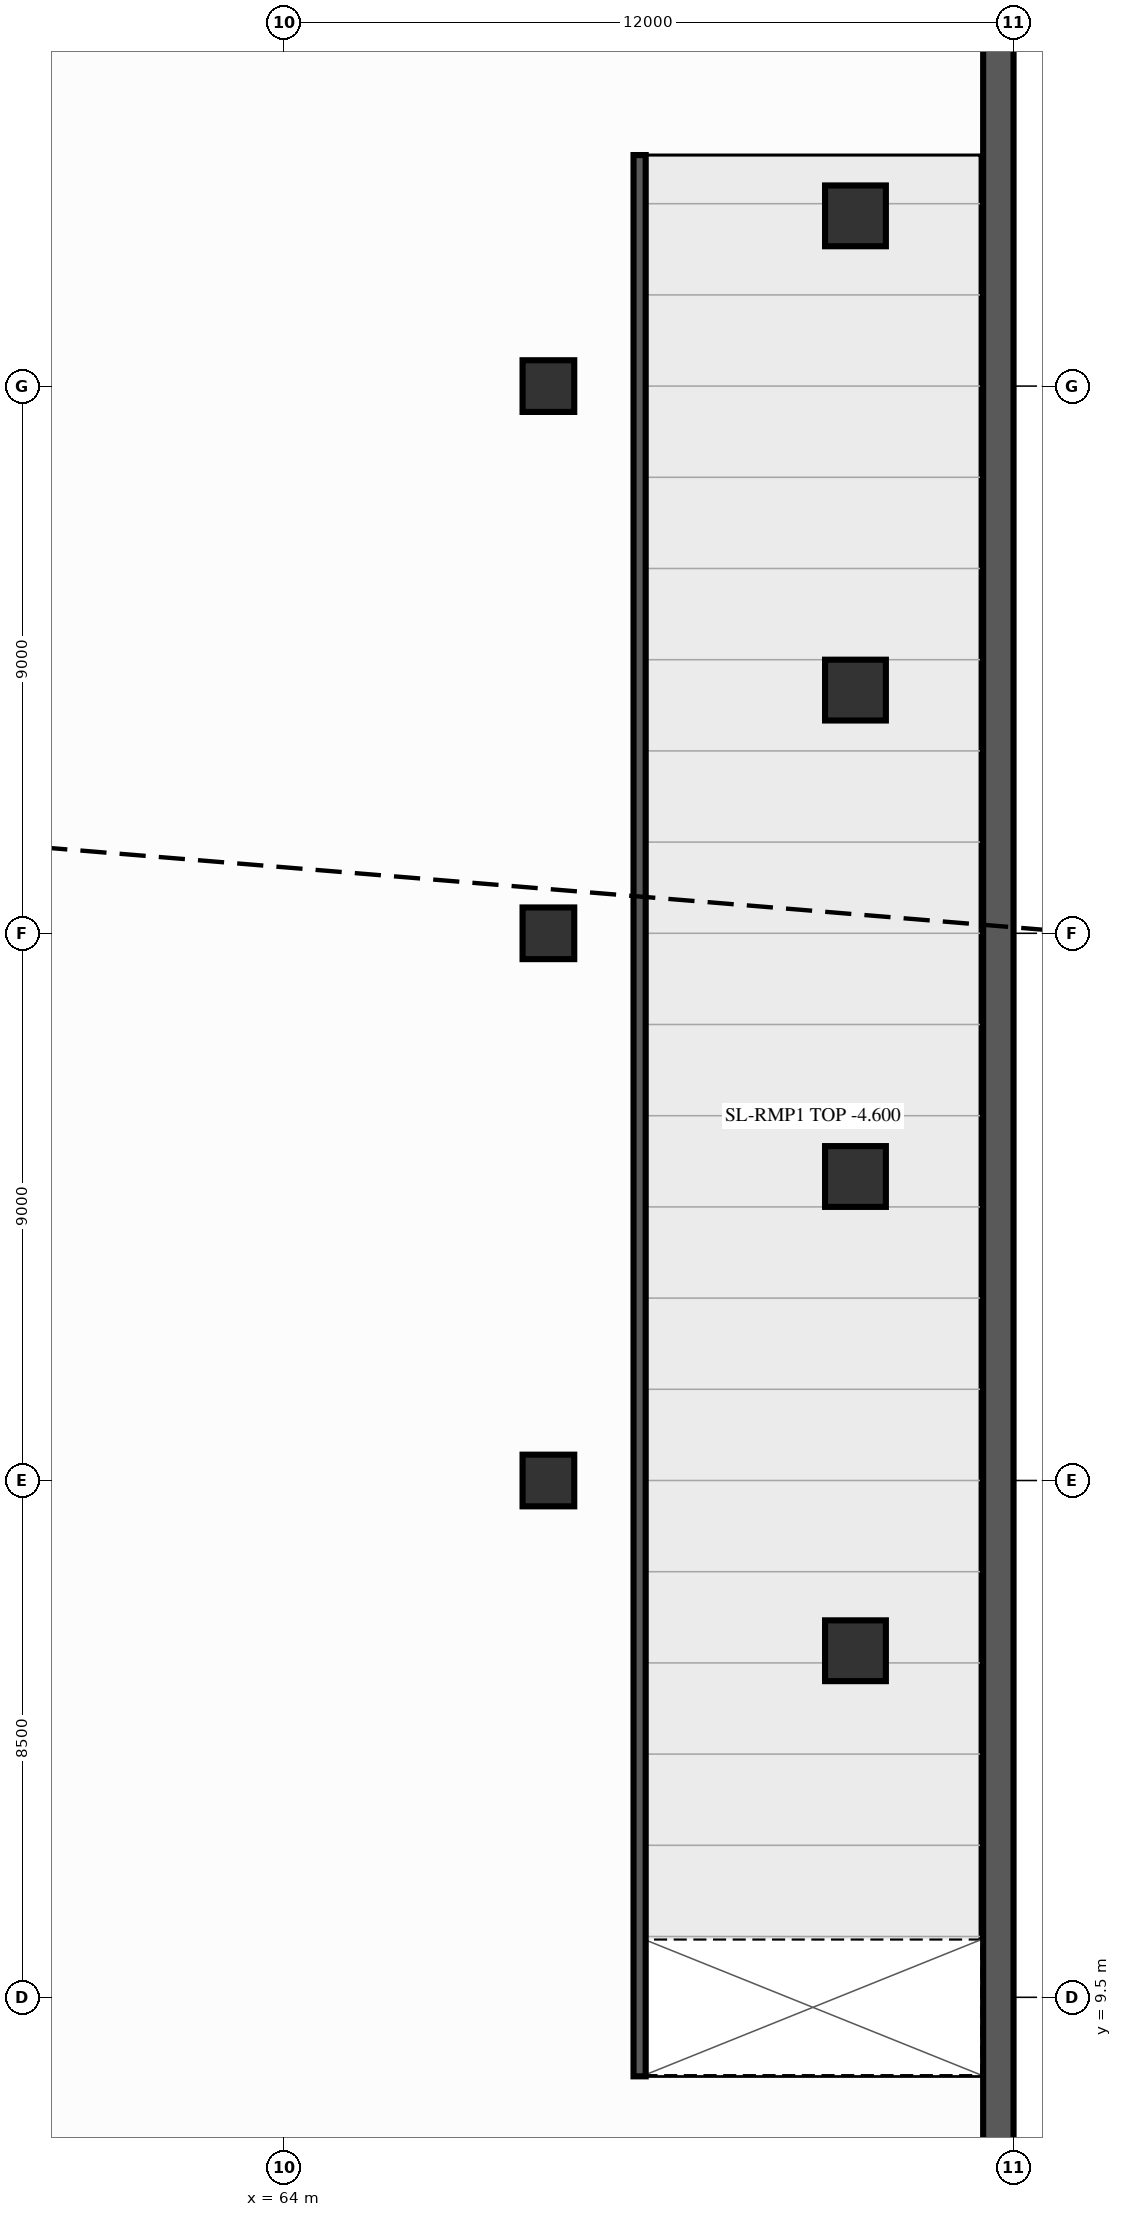
"""IFC4 building model, lengths in metres.
Left out: names, types, materials, properties, quantities, classifications, styles, units other than length and angle.
Written with IfcOpenShell. Run it as: python <this file> out.ifc"""

import sys

from ifc_helpers import new_model, si_unit, direction, frame, frame_2d, origin, origin_2d, place, context, subcontext, project, spatial, rectangle, circle, extrude, source, transform, mapped, element, save


model = new_model("IFC4")
c1 = context("Model", 3, precision=1e-05, world=origin(), true_north=direction((0.0, 1.0)))
c2 = subcontext(c1, "Body", "Model", "MODEL_VIEW")
j1 = project(units=[si_unit("LENGTHUNIT", "METRE"), si_unit("PLANEANGLEUNIT", "RADIAN")], contexts=[c1])
p1 = place(None, origin())
s1 = spatial("IfcSite", under=j1, at=p1, CompositionType="ELEMENT")
p2 = place(p1, origin())
s2 = spatial("IfcBuilding", under=s1, at=p2, CompositionType="ELEMENT")
p3 = place(p2, frame((0.0, 0.0, -9.2)))
s3 = spatial("IfcBuildingStorey", under=s2, at=p3, CompositionType="ELEMENT", Elevation=-9.2)
p4 = place(p3, frame((75.75, 0.5, 0.0), z_axis=(0.0, 0.0, 1.0), x_axis=(0.0, 1.0, 0.0)))
e1 = element("IfcWall", 1, at=p4, inside=s3, PredefinedType="USERDEFINED", context=c2, shape_type="SweptSolid", body=[
    extrude(rectangle(XDim=53.0, YDim=0.5, at=frame_2d((26.5, 0.0))), origin(), (0.0, 0.0, 1.0), 4.6),
])
m1 = source(origin(), c2, "Body", "SweptSolid", [
    extrude(circle(Radius=0.5, at=origin_2d()), origin(), (0.0, 0.0, 1.0), 4.6),
])
for number, where, z_axis, x_axis in (
    (2, (73.4, 15.2, 0.0), (0.0, 0.0, 1.0), (1.0, 0.0, 0.0)),
    (3, (73.4, 23.0, 0.0), (0.0, 0.0, 1.0), (1.0, 0.0, 0.0)),
    (4, (73.4, 31.0, 0.0), (0.0, 0.0, 1.0), (1.0, 0.0, 0.0)),
    (5, (73.4, 38.8, 0.0), (0.0, 0.0, 1.0), (1.0, 0.0, 0.0)),
):
    element("IfcColumn", number, at=place(p3, frame(where, z_axis=z_axis, x_axis=x_axis)), inside=s3, PredefinedType="COLUMN", context=c2, shape_type="MappedRepresentation", body=[
        mapped(m1, transform((0.0, 0.0, 0.0), scale=1.0)),
    ])
m2 = source(origin(), c2, "Body", "SweptSolid", [
    extrude(circle(Radius=0.425, at=origin_2d()), origin(), (0.0, 0.0, 1.0), 4.6),
])
for number, where, z_axis, x_axis in (
    (6, (68.35, 18.0, 0.0), (0.0, 0.0, 1.0), (1.0, 0.0, 0.0)),
    (7, (68.35, 27.0, 0.0), (0.0, 0.0, 1.0), (1.0, 0.0, 0.0)),
    (8, (68.35, 36.0, 0.0), (0.0, 0.0, 1.0), (1.0, 0.0, 0.0)),
):
    element("IfcColumn", number, at=place(p3, frame(where, z_axis=z_axis, x_axis=x_axis)), inside=s3, PredefinedType="COLUMN", context=c2, shape_type="MappedRepresentation", body=[
        mapped(m2, transform((0.0, 0.0, 0.0), scale=1.0)),
    ])
p5 = place(p3, frame((69.85, 8.2, 0.0), z_axis=(0.0, 0.0, 1.0), x_axis=(0.0, 1.0, 0.0)))
e9 = element("IfcWall", 9, at=p5, inside=s3, PredefinedType="PARTITIONING", context=c2, shape_type="SweptSolid", body=[
    extrude(rectangle(XDim=31.6, YDim=0.2, at=frame_2d((15.8, 0.0))), origin(), (0.0, 0.0, 1.0), 4.3),
])
save(model, sys.argv[1])
